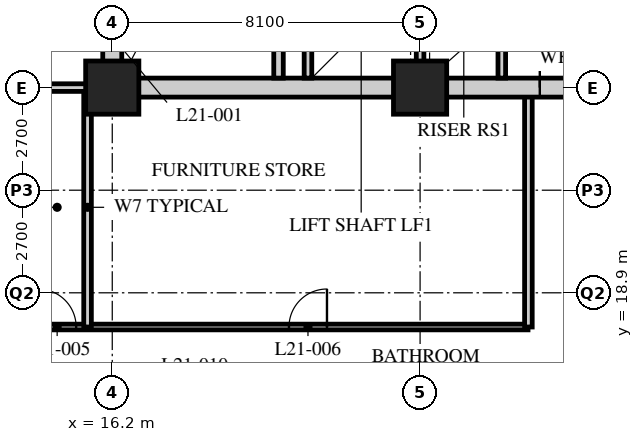
"""IFC4 building model, lengths in metres.
Left out: names, types, materials, properties, quantities, classifications, styles, units other than length and angle.
Written with IfcOpenShell. Run it as: python <this file> out.ifc"""

import sys

from ifc_helpers import new_model, si_unit, direction, frame, frame_2d, origin, origin_2d, place, context, subcontext, project, spatial, rectangle, hollow_rectangle, extrude, element, fill, save


model = new_model("IFC4")
c1 = context("Model", 3, precision=1e-05, world=origin(), true_north=direction((0.0, 1.0)))
c2 = subcontext(c1, "Body", "Model", "MODEL_VIEW")
j1 = project(units=[si_unit("LENGTHUNIT", "METRE"), si_unit("PLANEANGLEUNIT", "RADIAN")], contexts=[c1])
p1 = place(None, origin())
s1 = spatial("IfcSite", under=j1, at=p1, CompositionType="ELEMENT")
p2 = place(p1, origin())
s2 = spatial("IfcBuilding", under=s1, at=p2, CompositionType="ELEMENT")
p3 = place(p2, frame((0.0, 0.0, 84.0)))
s3 = spatial("IfcBuildingStorey", under=s2, at=p3, CompositionType="ELEMENT", Elevation=84.0)
for number, where, z_axis, x_axis in (
    (1, (16.2, 24.3, 0.0), (0.0, 0.0, 1.0), (1.0, 0.0, 0.0)),
    (2, (24.3, 24.3, 0.0), (0.0, 0.0, 1.0), (1.0, 0.0, 0.0)),
):
    element("IfcColumn", number, at=place(p3, frame(where, z_axis=z_axis, x_axis=x_axis)), inside=s3, PredefinedType="COLUMN", context=c2, shape_type="SweptSolid", body=[
        extrude(hollow_rectangle(XDim=1.4, YDim=1.4, WallThickness=0.12, at=origin_2d()), origin(), (0.0, 0.0, 1.0), 3.4),
    ])
p4 = place(p3, frame((13.95, 18.0, 0.0), z_axis=(0.0, 0.0, 1.0), x_axis=(1.0, 0.0, 0.0)))
e3 = element("IfcWall", 3, at=p4, inside=s3, PredefinedType="PARTITIONING", context=c2, shape_type="SweptSolid", body=[
    extrude(rectangle(XDim=13.19, YDim=0.15, at=frame_2d((6.595, 0.0))), origin(), (0.0, 0.0, 1.0), 3.19),
])
p5 = place(p4, frame((0.3, 0.0, 0.0)))
e4 = element("IfcOpeningElement", 4, at=p5, cuts=e3, PredefinedType="OPENING", context=c2, shape_type="SweptSolid", body=[
    extrude(rectangle(XDim=1.0, YDim=2.1, at=frame_2d((0.5, 1.05))), frame((0.0, 0.085, 0.0), z_axis=(0.0, -1.0, 0.0), x_axis=(1.0, 0.0, 0.0)), (0.0, 0.0, 1.0), 0.17),
])
p6 = place(p4, frame((6.9, 0.0, 0.0)))
e5 = element("IfcOpeningElement", 5, at=p6, cuts=e3, PredefinedType="OPENING", context=c2, shape_type="SweptSolid", body=[
    extrude(rectangle(XDim=1.0, YDim=2.1, at=frame_2d((0.5, 1.05))), frame((0.0, 0.085, 0.0), z_axis=(0.0, -1.0, 0.0), x_axis=(1.0, 0.0, 0.0)), (0.0, 0.0, 1.0), 0.17),
])
for number, where, z_axis, x_axis in (
    (6, (15.55, 18.0, 0.0), (0.0, 0.0, 1.0), (0.0, 1.0, 0.0)),
    (7, (27.15, 18.0, 0.0), (0.0, 0.0, 1.0), (0.0, 1.0, 0.0)),
):
    element("IfcWall", number, at=place(p3, frame(where, z_axis=z_axis, x_axis=x_axis)), inside=s3, PredefinedType="SOLIDWALL", context=c2, shape_type="SweptSolid", body=[
        extrude(rectangle(XDim=6.3, YDim=0.2, at=frame_2d((3.15, 0.0))), origin(), (0.0, 0.0, 1.0), 3.19),
    ])
p7 = place(p3, frame((13.95, 24.3, 0.0), z_axis=(0.0, 0.0, 1.0), x_axis=(1.0, 0.0, 0.0)))
e8 = element("IfcWall", 8, at=p7, inside=s3, PredefinedType="SOLIDWALL", context=c2, shape_type="SweptSolid", body=[
    extrude(rectangle(XDim=2.25, YDim=0.2, at=frame_2d((1.125, 0.0))), origin(), (0.0, 0.0, 1.0), 2.428),
])
p8 = place(p3, frame((15.95, 24.3, 0.0), z_axis=(0.0, 0.0, 1.0), x_axis=(1.0, 0.0, 0.0)))
e9 = element("IfcWall", 9, at=p8, inside=s3, PredefinedType="SOLIDWALL", context=c2, shape_type="SweptSolid", body=[
    extrude(rectangle(XDim=24.8, YDim=0.5, at=frame_2d((12.4, 0.0))), origin(), (0.0, 0.0, 1.0), 2.428),
])
p9 = place(p8, frame((11.5, 0.0, 0.0)))
e10 = element("IfcOpeningElement", 10, at=p9, cuts=e9, PredefinedType="OPENING", context=c2, shape_type="SweptSolid", body=[
    extrude(rectangle(XDim=1.8, YDim=2.4, at=frame_2d((0.9, 1.2))), frame((0.0, 0.26, 0.0), z_axis=(0.0, -1.0, 0.0), x_axis=(1.0, 0.0, 0.0)), (0.0, 0.0, 1.0), 0.52),
])
p10 = place(p3, frame((16.2, 24.55, 0.0), z_axis=(0.0, 0.0, 1.0), x_axis=(0.0, 1.0, 0.0)))
e11 = element("IfcWall", 11, at=p10, inside=s3, PredefinedType="SOLIDWALL", context=c2, shape_type="SweptSolid", body=[
    extrude(rectangle(XDim=15.7, YDim=0.5, at=frame_2d((7.85, 0.0))), origin(), (0.0, 0.0, 1.0), 2.428),
])
p11 = place(p3, frame((24.3, 24.55, 0.0), z_axis=(0.0, 0.0, 1.0), x_axis=(0.0, 1.0, 0.0)))
e12 = element("IfcWall", 12, at=p11, inside=s3, PredefinedType="SOLIDWALL", context=c2, shape_type="SweptSolid", body=[
    extrude(rectangle(XDim=7.75, YDim=0.2, at=frame_2d((3.875, 0.0))), origin(), (0.0, 0.0, 1.0), 2.578),
])
p12 = place(p11, frame((4.6, 0.0, 0.0)))
e13 = element("IfcOpeningElement", 13, at=p12, cuts=e12, PredefinedType="OPENING", context=c2, shape_type="SweptSolid", body=[
    extrude(rectangle(XDim=1.2, YDim=2.1, at=frame_2d((0.6, 1.05))), frame((0.0, 0.11, 0.0), z_axis=(0.0, -1.0, 0.0), x_axis=(1.0, 0.0, 0.0)), (0.0, 0.0, 1.0), 0.22),
])
p13 = place(p3, frame((20.575, 24.55, 0.0), z_axis=(0.0, 0.0, 1.0), x_axis=(0.0, 1.0, 0.0)))
e14 = element("IfcWall", 14, at=p13, inside=s3, PredefinedType="SOLIDWALL", context=c2, shape_type="SweptSolid", body=[
    extrude(rectangle(XDim=7.75, YDim=0.25, at=frame_2d((3.875, 0.0))), origin(), (0.0, 0.0, 1.0), 3.19),
])
p14 = place(p13, frame((6.2, 0.0, 0.0)))
e15 = element("IfcOpeningElement", 15, at=p14, cuts=e14, PredefinedType="OPENING", context=c2, shape_type="SweptSolid", body=[
    extrude(rectangle(XDim=1.2, YDim=2.1, at=frame_2d((0.6, 1.05))), frame((0.0, 0.135, 0.0), z_axis=(0.0, -1.0, 0.0), x_axis=(1.0, 0.0, 0.0)), (0.0, 0.0, 1.0), 0.27),
])
p15 = place(p3, frame((21.35, 24.55, 0.0), z_axis=(0.0, 0.0, 1.0), x_axis=(0.0, 1.0, 0.0)))
e16 = element("IfcWall", 16, at=p15, inside=s3, PredefinedType="SOLIDWALL", context=c2, shape_type="SweptSolid", body=[
    extrude(rectangle(XDim=2.6, YDim=0.2, at=frame_2d((1.3, 0.0))), origin(), (0.0, 0.0, 1.0), 3.19),
])
p16 = place(p3, frame((26.45, 24.55, 0.0), z_axis=(0.0, 0.0, 1.0), x_axis=(0.0, 1.0, 0.0)))
e17 = element("IfcWall", 17, at=p16, inside=s3, PredefinedType="SOLIDWALL", context=c2, shape_type="SweptSolid", body=[
    extrude(rectangle(XDim=1.6, YDim=0.2, at=frame_2d((0.8, 0.0))), origin(), (0.0, 0.0, 1.0), 3.19),
])
p17 = place(p5, origin())
e18 = element("IfcDoor", 18, at=p17, inside=s3, OperationType="SINGLE_SWING_LEFT", PredefinedType="DOOR", context=c2, shape_type="SweptSolid", body=[
    extrude(rectangle(XDim=1.0, YDim=2.1, at=frame_2d((0.5, 1.05))), frame((0.0, 0.025, 0.0), z_axis=(0.0, -1.0, 0.0), x_axis=(1.0, 0.0, 0.0)), (0.0, 0.0, 1.0), 0.05),
])
fill(e4, e18)
p18 = place(p6, origin())
e19 = element("IfcDoor", 19, at=p18, inside=s3, OperationType="SINGLE_SWING_RIGHT", PredefinedType="DOOR", context=c2, shape_type="SweptSolid", body=[
    extrude(rectangle(XDim=1.0, YDim=2.1, at=frame_2d((0.5, 1.05))), frame((0.0, 0.025, 0.0), z_axis=(0.0, -1.0, 0.0), x_axis=(1.0, 0.0, 0.0)), (0.0, 0.0, 1.0), 0.05),
])
fill(e5, e19)
p19 = place(p9, origin())
e20 = element("IfcDoor", 20, at=p19, inside=s3, OperationType="DOUBLE_DOOR_SINGLE_SWING", PredefinedType="DOOR", context=c2, shape_type="SweptSolid", body=[
    extrude(rectangle(XDim=1.8, YDim=2.4, at=frame_2d((0.9, 1.2))), frame((0.0, 0.025, 0.0), z_axis=(0.0, -1.0, 0.0), x_axis=(1.0, 0.0, 0.0)), (0.0, 0.0, 1.0), 0.05),
])
fill(e10, e20)
save(model, sys.argv[1])
